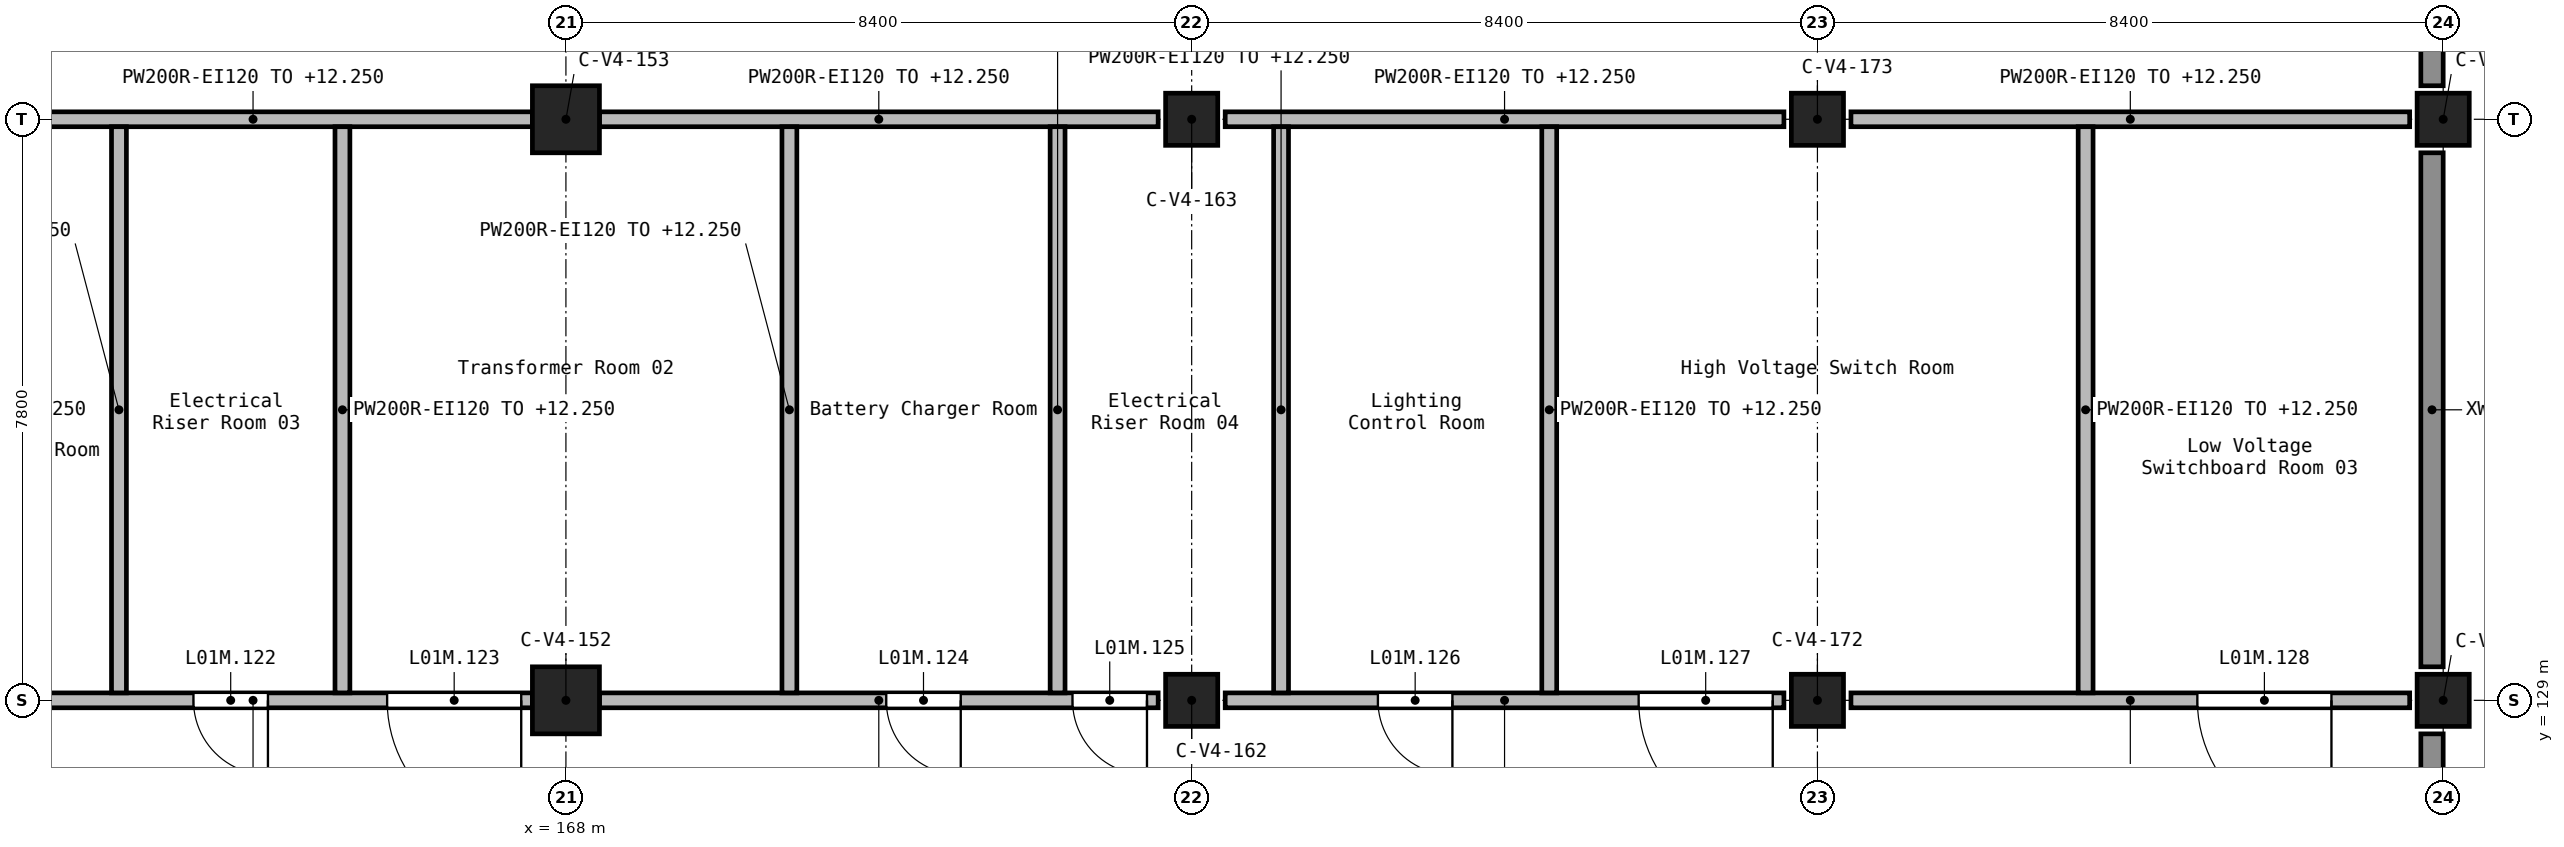
"""IFC4 building model, lengths in metres.
Left out: names, types, materials, properties, quantities, classifications, styles, units other than length and angle.
Written with IfcOpenShell. Run it as: python <this file> out.ifc"""

import sys

from ifc_helpers import new_model, si_unit, direction, frame, frame_2d, origin, origin_2d, place, context, subcontext, project, spatial, rectangle, extrude, element, fill, save


model = new_model("IFC4")
c1 = context("Model", 3, precision=1e-05, world=origin(), true_north=direction((0.0, 1.0)))
c2 = subcontext(c1, "Body", "Model", "MODEL_VIEW")
j1 = project(units=[si_unit("LENGTHUNIT", "METRE"), si_unit("PLANEANGLEUNIT", "RADIAN")], contexts=[c1])
p1 = place(None, origin())
s1 = spatial("IfcSite", under=j1, at=p1, CompositionType="ELEMENT")
p2 = place(p1, origin())
s2 = spatial("IfcBuilding", under=s1, at=p2, CompositionType="ELEMENT")
p3 = place(p2, frame((0.0, 0.0, 9.9)))
s3 = spatial("IfcBuildingStorey", under=s2, at=p3, CompositionType="ELEMENT", Elevation=9.9)
for number, where, z_axis, x_axis in (
    (1, (168.0, 129.0, 0.0), (0.0, 0.0, 1.0), (1.0, 0.0, 0.0)),
    (2, (168.0, 136.8, 0.0), (0.0, 0.0, 1.0), (1.0, 0.0, 0.0)),
):
    element("IfcColumn", number, at=place(p3, frame(where, z_axis=z_axis, x_axis=x_axis)), inside=s3, PredefinedType="COLUMN", context=c2, shape_type="SweptSolid", body=[
        extrude(rectangle(XDim=0.9, YDim=0.9, at=origin_2d()), origin(), (0.0, 0.0, 1.0), 2.7),
    ])
for number, where, z_axis, x_axis in (
    (3, (176.4, 129.0, 0.0), (0.0, 0.0, 1.0), (1.0, 0.0, 0.0)),
    (4, (176.4, 136.8, 0.0), (0.0, 0.0, 1.0), (1.0, 0.0, 0.0)),
    (5, (184.8, 129.0, 0.0), (0.0, 0.0, 1.0), (1.0, 0.0, 0.0)),
    (6, (184.8, 136.8, 0.0), (0.0, 0.0, 1.0), (1.0, 0.0, 0.0)),
    (7, (193.2, 129.0, 0.0), (0.0, 0.0, 1.0), (1.0, 0.0, 0.0)),
    (8, (193.2, 136.8, 0.0), (0.0, 0.0, 1.0), (1.0, 0.0, 0.0)),
):
    element("IfcColumn", number, at=place(p3, frame(where, z_axis=z_axis, x_axis=x_axis)), inside=s3, PredefinedType="COLUMN", context=c2, shape_type="SweptSolid", body=[
        extrude(rectangle(XDim=0.7, YDim=0.7, at=origin_2d()), origin(), (0.0, 0.0, 1.0), 2.7),
    ])
p4 = place(p3, frame((193.05, 125.85, 0.0), z_axis=(0.0, 0.0, 1.0), x_axis=(0.0, 1.0, 0.0)))
e9 = element("IfcWall", 9, at=p4, inside=s3, PredefinedType="STANDARD", context=c2, shape_type="SweptSolid", body=[
    extrude(rectangle(XDim=2.7, YDim=0.3, at=frame_2d((1.35, 0.0))), origin(), (0.0, 0.0, 1.0), 1.55),
])
p5 = place(p3, frame((193.05, 129.45, 0.0), z_axis=(0.0, 0.0, 1.0), x_axis=(0.0, 1.0, 0.0)))
e10 = element("IfcWall", 10, at=p5, inside=s3, PredefinedType="STANDARD", context=c2, shape_type="SweptSolid", body=[
    extrude(rectangle(XDim=6.9, YDim=0.3, at=frame_2d((3.45, 0.0))), origin(), (0.0, 0.0, 1.0), 1.55),
])
p6 = place(p3, frame((193.05, 137.25, 0.0), z_axis=(0.0, 0.0, 1.0), x_axis=(0.0, 1.0, 0.0)))
e11 = element("IfcWall", 11, at=p6, inside=s3, PredefinedType="STANDARD", context=c2, shape_type="SweptSolid", body=[
    extrude(rectangle(XDim=2.7, YDim=0.3, at=frame_2d((1.35, 0.0))), origin(), (0.0, 0.0, 1.0), 1.55),
])
p7 = place(p3, frame((192.75, 129.0, 0.0), z_axis=(0.0, 0.0, 1.0), x_axis=(-1.0, 0.0, 0.0)))
e12 = element("IfcWall", 12, at=p7, inside=s3, PredefinedType="SOLIDWALL", context=c2, shape_type="SweptSolid", body=[
    extrude(rectangle(XDim=7.5, YDim=0.2, at=frame_2d((3.75, 0.0))), origin(), (0.0, 0.0, 1.0), 2.35),
])
p8 = place(p7, frame((1.05, 0.0, 0.0)))
e13 = element("IfcOpeningElement", 13, at=p8, cuts=e12, PredefinedType="OPENING", context=c2, shape_type="SweptSolid", body=[
    extrude(rectangle(XDim=1.8, YDim=2.1, at=frame_2d((0.9, 1.05))), frame((0.0, 0.11, 0.0), z_axis=(0.0, -1.0, 0.0), x_axis=(1.0, 0.0, 0.0)), (0.0, 0.0, 1.0), 0.22),
])
p9 = place(p3, frame((184.35, 129.0, 0.0), z_axis=(0.0, 0.0, 1.0), x_axis=(-1.0, 0.0, 0.0)))
e14 = element("IfcWall", 14, at=p9, inside=s3, PredefinedType="SOLIDWALL", context=c2, shape_type="SweptSolid", body=[
    extrude(rectangle(XDim=7.5, YDim=0.2, at=frame_2d((3.75, 0.0))), origin(), (0.0, 0.0, 1.0), 2.35),
])
p10 = place(p9, frame((4.45, 0.0, 0.0)))
e15 = element("IfcOpeningElement", 15, at=p10, cuts=e14, PredefinedType="OPENING", context=c2, shape_type="SweptSolid", body=[
    extrude(rectangle(XDim=1.0, YDim=2.1, at=frame_2d((0.5, 1.05))), frame((0.0, 0.11, 0.0), z_axis=(0.0, -1.0, 0.0), x_axis=(1.0, 0.0, 0.0)), (0.0, 0.0, 1.0), 0.22),
])
p11 = place(p9, frame((0.15, 0.0, 0.0)))
e16 = element("IfcOpeningElement", 16, at=p11, cuts=e14, PredefinedType="OPENING", context=c2, shape_type="SweptSolid", body=[
    extrude(rectangle(XDim=1.8, YDim=2.1, at=frame_2d((0.9, 1.05))), frame((0.0, 0.11, 0.0), z_axis=(0.0, -1.0, 0.0), x_axis=(1.0, 0.0, 0.0)), (0.0, 0.0, 1.0), 0.22),
])
p12 = place(p3, frame((175.95, 129.0, 0.0), z_axis=(0.0, 0.0, 1.0), x_axis=(-1.0, 0.0, 0.0)))
e17 = element("IfcWall", 17, at=p12, inside=s3, PredefinedType="SOLIDWALL", context=c2, shape_type="SweptSolid", body=[
    extrude(rectangle(XDim=7.5, YDim=0.2, at=frame_2d((3.75, 0.0))), origin(), (0.0, 0.0, 1.0), 2.35),
])
p13 = place(p12, frame((2.65, 0.0, 0.0)))
e18 = element("IfcOpeningElement", 18, at=p13, cuts=e17, PredefinedType="OPENING", context=c2, shape_type="SweptSolid", body=[
    extrude(rectangle(XDim=1.0, YDim=2.1, at=frame_2d((0.5, 1.05))), frame((0.0, 0.11, 0.0), z_axis=(0.0, -1.0, 0.0), x_axis=(1.0, 0.0, 0.0)), (0.0, 0.0, 1.0), 0.22),
])
p14 = place(p12, frame((0.15, 0.0, 0.0)))
e19 = element("IfcOpeningElement", 19, at=p14, cuts=e17, PredefinedType="OPENING", context=c2, shape_type="SweptSolid", body=[
    extrude(rectangle(XDim=1.0, YDim=2.1, at=frame_2d((0.5, 1.05))), frame((0.0, 0.11, 0.0), z_axis=(0.0, -1.0, 0.0), x_axis=(1.0, 0.0, 0.0)), (0.0, 0.0, 1.0), 0.22),
])
p15 = place(p3, frame((167.55, 129.0, 0.0), z_axis=(0.0, 0.0, 1.0), x_axis=(-1.0, 0.0, 0.0)))
e20 = element("IfcWall", 20, at=p15, inside=s3, PredefinedType="SOLIDWALL", context=c2, shape_type="SweptSolid", body=[
    extrude(rectangle(XDim=7.5, YDim=0.2, at=frame_2d((3.75, 0.0))), origin(), (0.0, 0.0, 1.0), 2.35),
])
p16 = place(p15, frame((3.55, 0.0, 0.0)))
e21 = element("IfcOpeningElement", 21, at=p16, cuts=e20, PredefinedType="OPENING", context=c2, shape_type="SweptSolid", body=[
    extrude(rectangle(XDim=1.0, YDim=2.1, at=frame_2d((0.5, 1.05))), frame((0.0, 0.11, 0.0), z_axis=(0.0, -1.0, 0.0), x_axis=(1.0, 0.0, 0.0)), (0.0, 0.0, 1.0), 0.22),
])
p17 = place(p15, frame((0.15, 0.0, 0.0)))
e22 = element("IfcOpeningElement", 22, at=p17, cuts=e20, PredefinedType="OPENING", context=c2, shape_type="SweptSolid", body=[
    extrude(rectangle(XDim=1.8, YDim=2.1, at=frame_2d((0.9, 1.05))), frame((0.0, 0.11, 0.0), z_axis=(0.0, -1.0, 0.0), x_axis=(1.0, 0.0, 0.0)), (0.0, 0.0, 1.0), 0.22),
])
for number, where, z_axis, x_axis in (
    (23, (192.75, 136.8, 0.0), (0.0, 0.0, 1.0), (-1.0, 0.0, 0.0)),
    (24, (184.35, 136.8, 0.0), (0.0, 0.0, 1.0), (-1.0, 0.0, 0.0)),
    (25, (175.95, 136.8, 0.0), (0.0, 0.0, 1.0), (-1.0, 0.0, 0.0)),
    (26, (167.55, 136.8, 0.0), (0.0, 0.0, 1.0), (-1.0, 0.0, 0.0)),
):
    element("IfcWall", number, at=place(p3, frame(where, z_axis=z_axis, x_axis=x_axis)), inside=s3, PredefinedType="SOLIDWALL", context=c2, shape_type="SweptSolid", body=[
        extrude(rectangle(XDim=7.5, YDim=0.2, at=frame_2d((3.75, 0.0))), origin(), (0.0, 0.0, 1.0), 2.35),
    ])
for number, where, z_axis, x_axis in (
    (27, (162.0, 129.1, 0.0), (0.0, 0.0, 1.0), (0.0, 1.0, 0.0)),
    (28, (165.0, 129.1, 0.0), (0.0, 0.0, 1.0), (0.0, 1.0, 0.0)),
    (29, (171.0, 129.1, 0.0), (0.0, 0.0, 1.0), (0.0, 1.0, 0.0)),
    (30, (174.6, 129.1, 0.0), (0.0, 0.0, 1.0), (0.0, 1.0, 0.0)),
    (31, (177.6, 129.1, 0.0), (0.0, 0.0, 1.0), (0.0, 1.0, 0.0)),
    (32, (181.2, 129.1, 0.0), (0.0, 0.0, 1.0), (0.0, 1.0, 0.0)),
    (33, (188.4, 129.1, 0.0), (0.0, 0.0, 1.0), (0.0, 1.0, 0.0)),
):
    element("IfcWall", number, at=place(p3, frame(where, z_axis=z_axis, x_axis=x_axis)), inside=s3, PredefinedType="SOLIDWALL", context=c2, shape_type="SweptSolid", body=[
        extrude(rectangle(XDim=7.6, YDim=0.2, at=frame_2d((3.8, 0.0))), origin(), (0.0, 0.0, 1.0), 2.35),
    ])
p18 = place(p16, frame((1.0, 0.0, 0.0), z_axis=(0.0, 0.0, 1.0), x_axis=(-1.0, 0.0, 0.0)))
e34 = element("IfcDoor", 34, at=p18, inside=s3, OperationType="SINGLE_SWING_LEFT", PredefinedType="DOOR", context=c2, shape_type="SweptSolid", body=[
    extrude(rectangle(XDim=1.0, YDim=2.1, at=frame_2d((0.5, 1.05))), frame((0.0, 0.025, 0.0), z_axis=(0.0, -1.0, 0.0), x_axis=(1.0, 0.0, 0.0)), (0.0, 0.0, 1.0), 0.05),
])
fill(e21, e34)
p19 = place(p17, frame((1.8, 0.0, 0.0), z_axis=(0.0, 0.0, 1.0), x_axis=(-1.0, 0.0, 0.0)))
e35 = element("IfcDoor", 35, at=p19, inside=s3, OperationType="DOUBLE_DOOR_SINGLE_SWING", PredefinedType="DOOR", context=c2, shape_type="SweptSolid", body=[
    extrude(rectangle(XDim=1.8, YDim=2.1, at=frame_2d((0.9, 1.05))), frame((0.0, 0.025, 0.0), z_axis=(0.0, -1.0, 0.0), x_axis=(1.0, 0.0, 0.0)), (0.0, 0.0, 1.0), 0.05),
])
fill(e22, e35)
p20 = place(p13, frame((1.0, 0.0, 0.0), z_axis=(0.0, 0.0, 1.0), x_axis=(-1.0, 0.0, 0.0)))
e36 = element("IfcDoor", 36, at=p20, inside=s3, OperationType="SINGLE_SWING_RIGHT", PredefinedType="DOOR", context=c2, shape_type="SweptSolid", body=[
    extrude(rectangle(XDim=1.0, YDim=2.1, at=frame_2d((0.5, 1.05))), frame((0.0, 0.025, 0.0), z_axis=(0.0, -1.0, 0.0), x_axis=(1.0, 0.0, 0.0)), (0.0, 0.0, 1.0), 0.05),
])
fill(e18, e36)
p21 = place(p14, frame((1.0, 0.0, 0.0), z_axis=(0.0, 0.0, 1.0), x_axis=(-1.0, 0.0, 0.0)))
e37 = element("IfcDoor", 37, at=p21, inside=s3, OperationType="SINGLE_SWING_RIGHT", PredefinedType="DOOR", context=c2, shape_type="SweptSolid", body=[
    extrude(rectangle(XDim=1.0, YDim=2.1, at=frame_2d((0.5, 1.05))), frame((0.0, 0.025, 0.0), z_axis=(0.0, -1.0, 0.0), x_axis=(1.0, 0.0, 0.0)), (0.0, 0.0, 1.0), 0.05),
])
fill(e19, e37)
p22 = place(p10, frame((1.0, 0.0, 0.0), z_axis=(0.0, 0.0, 1.0), x_axis=(-1.0, 0.0, 0.0)))
e38 = element("IfcDoor", 38, at=p22, inside=s3, OperationType="SINGLE_SWING_LEFT", PredefinedType="DOOR", context=c2, shape_type="SweptSolid", body=[
    extrude(rectangle(XDim=1.0, YDim=2.1, at=frame_2d((0.5, 1.05))), frame((0.0, 0.025, 0.0), z_axis=(0.0, -1.0, 0.0), x_axis=(1.0, 0.0, 0.0)), (0.0, 0.0, 1.0), 0.05),
])
fill(e15, e38)
p23 = place(p11, frame((1.8, 0.0, 0.0), z_axis=(0.0, 0.0, 1.0), x_axis=(-1.0, 0.0, 0.0)))
e39 = element("IfcDoor", 39, at=p23, inside=s3, OperationType="DOUBLE_DOOR_SINGLE_SWING", PredefinedType="DOOR", context=c2, shape_type="SweptSolid", body=[
    extrude(rectangle(XDim=1.8, YDim=2.1, at=frame_2d((0.9, 1.05))), frame((0.0, 0.025, 0.0), z_axis=(0.0, -1.0, 0.0), x_axis=(1.0, 0.0, 0.0)), (0.0, 0.0, 1.0), 0.05),
])
fill(e16, e39)
p24 = place(p8, frame((1.8, 0.0, 0.0), z_axis=(0.0, 0.0, 1.0), x_axis=(-1.0, 0.0, 0.0)))
e40 = element("IfcDoor", 40, at=p24, inside=s3, OperationType="DOUBLE_DOOR_SINGLE_SWING", PredefinedType="DOOR", context=c2, shape_type="SweptSolid", body=[
    extrude(rectangle(XDim=1.8, YDim=2.1, at=frame_2d((0.9, 1.05))), frame((0.0, 0.025, 0.0), z_axis=(0.0, -1.0, 0.0), x_axis=(1.0, 0.0, 0.0)), (0.0, 0.0, 1.0), 0.05),
])
fill(e13, e40)
save(model, sys.argv[1])
